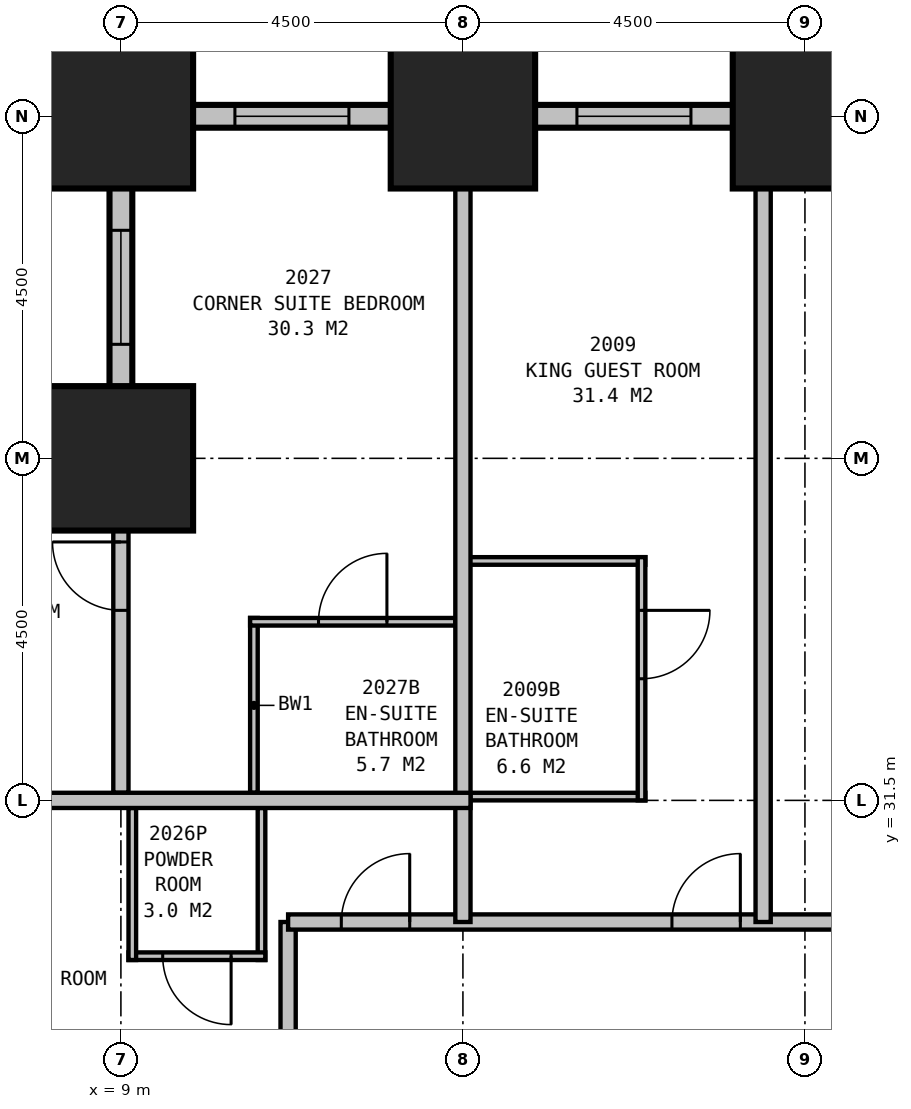
"""IFC4 building model, lengths in metres.
Left out: names, types, materials, properties, quantities, classifications, styles, units other than length and angle.
Written with IfcOpenShell. Run it as: python <this file> out.ifc"""

import sys

from ifc_helpers import new_model, si_unit, direction, frame, frame_2d, origin, origin_2d, place, context, subcontext, project, spatial, rectangle, extrude, element, fill, save


model = new_model("IFC4")
c1 = context("Model", 3, precision=1e-05, world=origin(), true_north=direction((0.0, 1.0)))
c2 = subcontext(c1, "Body", "Model", "MODEL_VIEW")
j1 = project(units=[si_unit("LENGTHUNIT", "METRE"), si_unit("PLANEANGLEUNIT", "RADIAN")], contexts=[c1])
p1 = place(None, origin())
s1 = spatial("IfcSite", under=j1, at=p1, CompositionType="ELEMENT")
p2 = place(p1, origin())
s2 = spatial("IfcBuilding", under=s1, at=p2, CompositionType="ELEMENT")
p3 = place(p2, frame((0.0, 0.0, 82.2)))
s3 = spatial("IfcBuildingStorey", under=s2, at=p3, CompositionType="ELEMENT", Elevation=82.2)
for number, where, z_axis, x_axis in (
    (1, (18.0, 40.5, 0.0), (0.0, 0.0, 1.0), (1.0, 0.0, 0.0)),
    (2, (13.5, 40.5, 0.0), (0.0, 0.0, 1.0), (1.0, 0.0, 0.0)),
    (3, (9.0, 40.5, 0.0), (0.0, 0.0, 1.0), (1.0, 0.0, 0.0)),
    (4, (9.0, 36.0, 0.0), (0.0, 0.0, 1.0), (1.0, 0.0, 0.0)),
):
    element("IfcColumn", number, at=place(p3, frame(where, z_axis=z_axis, x_axis=x_axis)), inside=s3, PredefinedType="COLUMN", context=c2, shape_type="SweptSolid", body=[
        extrude(rectangle(XDim=1.9, YDim=1.9, at=origin_2d()), origin(), (0.0, 0.0, 1.0), 3.5),
    ])
p4 = place(p3, frame((40.65, 40.5, 0.0), z_axis=(0.0, 0.0, 1.0), x_axis=(-1.0, 0.0, 0.0)))
e5 = element("IfcWall", 5, at=p4, inside=s3, PredefinedType="STANDARD", context=c2, shape_type="SweptSolid", body=[
    extrude(rectangle(XDim=31.8, YDim=0.3, at=frame_2d((15.9, 0.0))), origin(), (0.0, 0.0, 1.0), 2.1),
])
p5 = place(p4, frame((1.65, 0.0, 0.5)))
e6 = element("IfcOpeningElement", 6, at=p5, cuts=e5, PredefinedType="OPENING", context=c2, shape_type="SweptSolid", body=[
    extrude(rectangle(XDim=1.5, YDim=1.4, at=frame_2d((0.75, 0.7))), frame((0.0, 0.16, 0.0), z_axis=(0.0, -1.0, 0.0), x_axis=(1.0, 0.0, 0.0)), (0.0, 0.0, 1.0), 0.32),
])
p6 = place(p4, frame((6.15, 0.0, 0.5)))
e7 = element("IfcOpeningElement", 7, at=p6, cuts=e5, PredefinedType="OPENING", context=c2, shape_type="SweptSolid", body=[
    extrude(rectangle(XDim=1.5, YDim=1.4, at=frame_2d((0.75, 0.7))), frame((0.0, 0.16, 0.0), z_axis=(0.0, -1.0, 0.0), x_axis=(1.0, 0.0, 0.0)), (0.0, 0.0, 1.0), 0.32),
])
p7 = place(p4, frame((10.65, 0.0, 0.5)))
e8 = element("IfcOpeningElement", 8, at=p7, cuts=e5, PredefinedType="OPENING", context=c2, shape_type="SweptSolid", body=[
    extrude(rectangle(XDim=1.5, YDim=1.4, at=frame_2d((0.75, 0.7))), frame((0.0, 0.16, 0.0), z_axis=(0.0, -1.0, 0.0), x_axis=(1.0, 0.0, 0.0)), (0.0, 0.0, 1.0), 0.32),
])
p8 = place(p4, frame((15.15, 0.0, 0.5)))
e9 = element("IfcOpeningElement", 9, at=p8, cuts=e5, PredefinedType="OPENING", context=c2, shape_type="SweptSolid", body=[
    extrude(rectangle(XDim=1.5, YDim=1.4, at=frame_2d((0.75, 0.7))), frame((0.0, 0.16, 0.0), z_axis=(0.0, -1.0, 0.0), x_axis=(1.0, 0.0, 0.0)), (0.0, 0.0, 1.0), 0.32),
])
p9 = place(p4, frame((19.65, 0.0, 0.5)))
e10 = element("IfcOpeningElement", 10, at=p9, cuts=e5, PredefinedType="OPENING", context=c2, shape_type="SweptSolid", body=[
    extrude(rectangle(XDim=1.5, YDim=1.4, at=frame_2d((0.75, 0.7))), frame((0.0, 0.16, 0.0), z_axis=(0.0, -1.0, 0.0), x_axis=(1.0, 0.0, 0.0)), (0.0, 0.0, 1.0), 0.32),
])
p10 = place(p4, frame((24.15, 0.0, 0.5)))
e11 = element("IfcOpeningElement", 11, at=p10, cuts=e5, PredefinedType="OPENING", context=c2, shape_type="SweptSolid", body=[
    extrude(rectangle(XDim=1.5, YDim=1.4, at=frame_2d((0.75, 0.7))), frame((0.0, 0.16, 0.0), z_axis=(0.0, -1.0, 0.0), x_axis=(1.0, 0.0, 0.0)), (0.0, 0.0, 1.0), 0.32),
])
p11 = place(p4, frame((28.65, 0.0, 0.5)))
e12 = element("IfcOpeningElement", 12, at=p11, cuts=e5, PredefinedType="OPENING", context=c2, shape_type="SweptSolid", body=[
    extrude(rectangle(XDim=1.5, YDim=1.4, at=frame_2d((0.75, 0.7))), frame((0.0, 0.16, 0.0), z_axis=(0.0, -1.0, 0.0), x_axis=(1.0, 0.0, 0.0)), (0.0, 0.0, 1.0), 0.32),
])
p12 = place(p3, frame((9.0, 40.65, 0.0), z_axis=(0.0, 0.0, 1.0), x_axis=(0.0, -1.0, 0.0)))
e13 = element("IfcWall", 13, at=p12, inside=s3, PredefinedType="STANDARD", context=c2, shape_type="SweptSolid", body=[
    extrude(rectangle(XDim=4.8, YDim=0.3, at=frame_2d((2.4, 0.0))), origin(), (0.0, 0.0, 1.0), 2.1),
])
p13 = place(p12, frame((1.65, 0.0, 0.5)))
e14 = element("IfcOpeningElement", 14, at=p13, cuts=e13, PredefinedType="OPENING", context=c2, shape_type="SweptSolid", body=[
    extrude(rectangle(XDim=1.5, YDim=1.4, at=frame_2d((0.75, 0.7))), frame((0.0, 0.16, 0.0), z_axis=(0.0, -1.0, 0.0), x_axis=(1.0, 0.0, 0.0)), (0.0, 0.0, 1.0), 0.32),
])
p14 = place(p3, frame((9.15, 36.0, 0.0), z_axis=(0.0, 0.0, 1.0), x_axis=(-1.0, 0.0, 0.0)))
e15 = element("IfcWall", 15, at=p14, inside=s3, PredefinedType="STANDARD", context=c2, shape_type="SweptSolid", body=[
    extrude(rectangle(XDim=5.3, YDim=0.3, at=frame_2d((2.65, 0.0))), origin(), (0.0, 0.0, 1.0), 2.1),
])
p15 = place(p14, frame((1.45, 0.0, 0.5)))
e16 = element("IfcOpeningElement", 16, at=p15, cuts=e15, PredefinedType="OPENING", context=c2, shape_type="SweptSolid", body=[
    extrude(rectangle(XDim=2.4, YDim=1.4, at=frame_2d((1.2, 0.7))), frame((0.0, 0.16, 0.0), z_axis=(0.0, -1.0, 0.0), x_axis=(1.0, 0.0, 0.0)), (0.0, 0.0, 1.0), 0.32),
])
p16 = place(p3, frame((11.2, 29.9, 0.0), z_axis=(0.0, 0.0, 1.0), x_axis=(1.0, 0.0, 0.0)))
e17 = element("IfcWall", 17, at=p16, inside=s3, PredefinedType="PARTITIONING", context=c2, shape_type="SweptSolid", body=[
    extrude(rectangle(XDim=27.1, YDim=0.2, at=frame_2d((13.55, 0.0))), origin(), (0.0, 0.0, 1.0), 3.25),
])
p17 = place(p16, frame((5.05, 0.0, 0.0)))
e18 = element("IfcOpeningElement", 18, at=p17, cuts=e17, PredefinedType="OPENING", context=c2, shape_type="SweptSolid", body=[
    extrude(rectangle(XDim=0.9, YDim=2.1, at=frame_2d((0.45, 1.05))), frame((0.0, 0.11, 0.0), z_axis=(0.0, -1.0, 0.0), x_axis=(1.0, 0.0, 0.0)), (0.0, 0.0, 1.0), 0.22),
])
p18 = place(p16, frame((7.65, 0.0, 0.0)))
e19 = element("IfcOpeningElement", 19, at=p18, cuts=e17, PredefinedType="OPENING", context=c2, shape_type="SweptSolid", body=[
    extrude(rectangle(XDim=0.9, YDim=2.1, at=frame_2d((0.45, 1.05))), frame((0.0, 0.11, 0.0), z_axis=(0.0, -1.0, 0.0), x_axis=(1.0, 0.0, 0.0)), (0.0, 0.0, 1.0), 0.22),
])
p19 = place(p16, frame((12.0, 0.0, 0.0)))
e20 = element("IfcOpeningElement", 20, at=p19, cuts=e17, PredefinedType="OPENING", context=c2, shape_type="SweptSolid", body=[
    extrude(rectangle(XDim=1.0, YDim=2.1, at=frame_2d((0.5, 1.05))), frame((0.0, 0.11, 0.0), z_axis=(0.0, -1.0, 0.0), x_axis=(1.0, 0.0, 0.0)), (0.0, 0.0, 1.0), 0.22),
])
p20 = place(p16, frame((17.45, 0.0, 0.0)))
e21 = element("IfcOpeningElement", 21, at=p20, cuts=e17, PredefinedType="OPENING", context=c2, shape_type="SweptSolid", body=[
    extrude(rectangle(XDim=0.9, YDim=2.1, at=frame_2d((0.45, 1.05))), frame((0.0, 0.11, 0.0), z_axis=(0.0, -1.0, 0.0), x_axis=(1.0, 0.0, 0.0)), (0.0, 0.0, 1.0), 0.22),
])
p21 = place(p16, frame((21.8, 0.0, 0.0)))
e22 = element("IfcOpeningElement", 22, at=p21, cuts=e17, PredefinedType="OPENING", context=c2, shape_type="SweptSolid", body=[
    extrude(rectangle(XDim=0.9, YDim=2.1, at=frame_2d((0.45, 1.05))), frame((0.0, 0.11, 0.0), z_axis=(0.0, -1.0, 0.0), x_axis=(1.0, 0.0, 0.0)), (0.0, 0.0, 1.0), 0.22),
])
p22 = place(p16, frame((25.5, 0.0, 0.0)))
e23 = element("IfcOpeningElement", 23, at=p22, cuts=e17, PredefinedType="OPENING", context=c2, shape_type="SweptSolid", body=[
    extrude(rectangle(XDim=0.9, YDim=2.1, at=frame_2d((0.45, 1.05))), frame((0.0, 0.11, 0.0), z_axis=(0.0, -1.0, 0.0), x_axis=(1.0, 0.0, 0.0)), (0.0, 0.0, 1.0), 0.22),
])
p23 = place(p16, frame((0.7, 0.0, 0.0)))
e24 = element("IfcOpeningElement", 24, at=p23, cuts=e17, PredefinedType="OPENING", context=c2, shape_type="SweptSolid", body=[
    extrude(rectangle(XDim=0.9, YDim=2.1, at=frame_2d((0.45, 1.05))), frame((0.0, 0.11, 0.0), z_axis=(0.0, -1.0, 0.0), x_axis=(1.0, 0.0, 0.0)), (0.0, 0.0, 1.0), 0.22),
])
p24 = place(p3, frame((11.2, 11.2, 0.0), z_axis=(0.0, 0.0, 1.0), x_axis=(0.0, 1.0, 0.0)))
e25 = element("IfcWall", 25, at=p24, inside=s3, PredefinedType="PARTITIONING", context=c2, shape_type="SweptSolid", body=[
    extrude(rectangle(XDim=18.7, YDim=0.2, at=frame_2d((9.35, 0.0))), origin(), (0.0, 0.0, 1.0), 3.25),
])
p25 = place(p24, frame((3.05, 0.0, 0.0)))
e26 = element("IfcOpeningElement", 26, at=p25, cuts=e25, PredefinedType="OPENING", context=c2, shape_type="SweptSolid", body=[
    extrude(rectangle(XDim=1.0, YDim=2.1, at=frame_2d((0.5, 1.05))), frame((0.0, 0.11, 0.0), z_axis=(0.0, -1.0, 0.0), x_axis=(1.0, 0.0, 0.0)), (0.0, 0.0, 1.0), 0.22),
])
p26 = place(p24, frame((6.65, 0.0, 0.0)))
e27 = element("IfcOpeningElement", 27, at=p26, cuts=e25, PredefinedType="OPENING", context=c2, shape_type="SweptSolid", body=[
    extrude(rectangle(XDim=0.9, YDim=2.1, at=frame_2d((0.45, 1.05))), frame((0.0, 0.11, 0.0), z_axis=(0.0, -1.0, 0.0), x_axis=(1.0, 0.0, 0.0)), (0.0, 0.0, 1.0), 0.22),
])
p27 = place(p3, frame((17.45, 29.9, 0.0), z_axis=(0.0, 0.0, 1.0), x_axis=(0.0, 1.0, 0.0)))
e28 = element("IfcWall", 28, at=p27, inside=s3, PredefinedType="PARTITIONING", context=c2, shape_type="SweptSolid", body=[
    extrude(rectangle(XDim=10.6, YDim=0.2, at=frame_2d((5.3, 0.0))), origin(), (0.0, 0.0, 1.0), 2.2),
])
for number, where, z_axis, x_axis in (
    (29, (13.5, 31.55, 0.0), (0.0, 0.0, 1.0), (1.0, 0.0, 0.0)),
    (30, (13.5, 34.65, 0.0), (0.0, 0.0, 1.0), (1.0, 0.0, 0.0)),
):
    element("IfcWall", number, at=place(p3, frame(where, z_axis=z_axis, x_axis=x_axis)), inside=s3, PredefinedType="PLUMBINGWALL", context=c2, shape_type="SweptSolid", body=[
        extrude(rectangle(XDim=2.4, YDim=0.1, at=frame_2d((1.2, 0.0))), origin(), (0.0, 0.0, 1.0), 3.25),
    ])
p28 = place(p3, frame((15.85, 31.5, 0.0), z_axis=(0.0, 0.0, 1.0), x_axis=(0.0, 1.0, 0.0)))
e31 = element("IfcWall", 31, at=p28, inside=s3, PredefinedType="PLUMBINGWALL", context=c2, shape_type="SweptSolid", body=[
    extrude(rectangle(XDim=3.2, YDim=0.1, at=frame_2d((1.6, 0.0))), origin(), (0.0, 0.0, 1.0), 3.25),
])
p29 = place(p28, frame((2.5, 0.0, 0.0), z_axis=(0.0, 0.0, 1.0), x_axis=(-1.0, 0.0, 0.0)))
e32 = element("IfcOpeningElement", 32, at=p29, cuts=e31, PredefinedType="OPENING", context=c2, shape_type="SweptSolid", body=[
    extrude(rectangle(XDim=0.9, YDim=2.1, at=frame_2d((0.45, 1.05))), frame((0.0, 0.06, 0.0), z_axis=(0.0, -1.0, 0.0), x_axis=(1.0, 0.0, 0.0)), (0.0, 0.0, 1.0), 0.12),
])
p30 = place(p3, frame((13.5, 29.9, 0.0), z_axis=(0.0, 0.0, 1.0), x_axis=(0.0, 1.0, 0.0)))
e33 = element("IfcWall", 33, at=p30, inside=s3, PredefinedType="PARTITIONING", context=c2, shape_type="SweptSolid", body=[
    extrude(rectangle(XDim=10.6, YDim=0.2, at=frame_2d((5.3, 0.0))), origin(), (0.0, 0.0, 1.0), 2.2),
])
p31 = place(p3, frame((13.6, 31.5, 0.0), z_axis=(0.0, 0.0, 1.0), x_axis=(-1.0, 0.0, 0.0)))
e34 = element("IfcWall", 34, at=p31, inside=s3, PredefinedType="PARTITIONING", context=c2, shape_type="SweptSolid", body=[
    extrude(rectangle(XDim=10.099, YDim=0.2, at=frame_2d((5.05, 0.0))), origin(), (0.0, 0.0, 1.0), 3.25),
])
p32 = place(p31, frame((8.999, 0.0, 0.0), z_axis=(0.0, 0.0, 1.0), x_axis=(-1.0, 0.0, 0.0)))
e35 = element("IfcOpeningElement", 35, at=p32, cuts=e34, PredefinedType="OPENING", context=c2, shape_type="SweptSolid", body=[
    extrude(rectangle(XDim=0.9, YDim=2.1, at=frame_2d((0.45, 1.05))), frame((0.0, 0.11, 0.0), z_axis=(0.0, -1.0, 0.0), x_axis=(1.0, 0.0, 0.0)), (0.0, 0.0, 1.0), 0.22),
])
p33 = place(p3, frame((9.15, 31.4, 0.0), z_axis=(0.0, 0.0, 1.0), x_axis=(0.0, -1.0, 0.0)))
e36 = element("IfcWall", 36, at=p33, inside=s3, PredefinedType="PLUMBINGWALL", context=c2, shape_type="SweptSolid", body=[
    extrude(rectangle(XDim=2.0, YDim=0.1, at=frame_2d((1.0, 0.0))), origin(), (0.0, 0.0, 1.0), 2.2),
])
p34 = place(p3, frame((10.85, 31.4, 0.0), z_axis=(0.0, 0.0, 1.0), x_axis=(0.0, -1.0, 0.0)))
e37 = element("IfcWall", 37, at=p34, inside=s3, PredefinedType="PLUMBINGWALL", context=c2, shape_type="SweptSolid", body=[
    extrude(rectangle(XDim=2.0, YDim=0.1, at=frame_2d((1.0, 0.0))), origin(), (0.0, 0.0, 1.0), 3.25),
])
p35 = place(p3, frame((10.9, 29.45, 0.0), z_axis=(0.0, 0.0, 1.0), x_axis=(-1.0, 0.0, 0.0)))
e38 = element("IfcWall", 38, at=p35, inside=s3, PredefinedType="PLUMBINGWALL", context=c2, shape_type="SweptSolid", body=[
    extrude(rectangle(XDim=1.8, YDim=0.1, at=frame_2d((0.9, 0.0))), origin(), (0.0, 0.0, 1.0), 3.25),
])
p36 = place(p35, frame((0.45, 0.0, 0.0)))
e39 = element("IfcOpeningElement", 39, at=p36, cuts=e38, PredefinedType="OPENING", context=c2, shape_type="SweptSolid", body=[
    extrude(rectangle(XDim=0.9, YDim=2.1, at=frame_2d((0.45, 1.05))), frame((0.0, 0.06, 0.0), z_axis=(0.0, -1.0, 0.0), x_axis=(1.0, 0.0, 0.0)), (0.0, 0.0, 1.0), 0.12),
])
p37 = place(p3, frame((9.0, 31.6, 0.0), z_axis=(0.0, 0.0, 1.0), x_axis=(0.0, 1.0, 0.0)))
e40 = element("IfcWall", 40, at=p37, inside=s3, PredefinedType="PARTITIONING", context=c2, shape_type="SweptSolid", body=[
    extrude(rectangle(XDim=4.4, YDim=0.2, at=frame_2d((2.2, 0.0))), origin(), (0.0, 0.0, 1.0), 2.2),
])
p38 = place(p37, frame((2.4, 0.0, 0.0)))
e41 = element("IfcOpeningElement", 41, at=p38, cuts=e40, PredefinedType="OPENING", context=c2, shape_type="SweptSolid", body=[
    extrude(rectangle(XDim=0.9, YDim=2.1, at=frame_2d((0.45, 1.05))), frame((0.0, 0.11, 0.0), z_axis=(0.0, -1.0, 0.0), x_axis=(1.0, 0.0, 0.0)), (0.0, 0.0, 1.0), 0.22),
])
p39 = place(p3, frame((10.75, 31.6, 0.0), z_axis=(0.0, 0.0, 1.0), x_axis=(0.0, 1.0, 0.0)))
e42 = element("IfcWall", 42, at=p39, inside=s3, PredefinedType="PLUMBINGWALL", context=c2, shape_type="SweptSolid", body=[
    extrude(rectangle(XDim=2.3, YDim=0.1, at=frame_2d((1.15, 0.0))), origin(), (0.0, 0.0, 1.0), 3.25),
])
p40 = place(p3, frame((13.4, 33.85, 0.0), z_axis=(0.0, 0.0, 1.0), x_axis=(-1.0, 0.0, 0.0)))
e43 = element("IfcWall", 43, at=p40, inside=s3, PredefinedType="PLUMBINGWALL", context=c2, shape_type="SweptSolid", body=[
    extrude(rectangle(XDim=2.7, YDim=0.1, at=frame_2d((1.35, 0.0))), origin(), (0.0, 0.0, 1.0), 3.25),
])
p41 = place(p40, frame((1.8, 0.0, 0.0), z_axis=(0.0, 0.0, 1.0), x_axis=(-1.0, 0.0, 0.0)))
e44 = element("IfcOpeningElement", 44, at=p41, cuts=e43, PredefinedType="OPENING", context=c2, shape_type="SweptSolid", body=[
    extrude(rectangle(XDim=0.9, YDim=2.1, at=frame_2d((0.45, 1.05))), frame((0.0, 0.06, 0.0), z_axis=(0.0, -1.0, 0.0), x_axis=(1.0, 0.0, 0.0)), (0.0, 0.0, 1.0), 0.12),
])
p42 = place(p10, origin())
e45 = element("IfcWindow", 45, at=p42, inside=s3, PartitioningType="SINGLE_PANEL", PredefinedType="WINDOW", context=c2, shape_type="SweptSolid", body=[
    extrude(rectangle(XDim=1.5, YDim=1.4, at=frame_2d((0.75, 0.7))), frame((0.0, 0.03, 0.0), z_axis=(0.0, -1.0, 0.0), x_axis=(1.0, 0.0, 0.0)), (0.0, 0.0, 1.0), 0.06),
])
fill(e11, e45)
p43 = place(p11, origin())
e46 = element("IfcWindow", 46, at=p43, inside=s3, PartitioningType="SINGLE_PANEL", PredefinedType="WINDOW", context=c2, shape_type="SweptSolid", body=[
    extrude(rectangle(XDim=1.5, YDim=1.4, at=frame_2d((0.75, 0.7))), frame((0.0, 0.03, 0.0), z_axis=(0.0, -1.0, 0.0), x_axis=(1.0, 0.0, 0.0)), (0.0, 0.0, 1.0), 0.06),
])
fill(e12, e46)
p44 = place(p13, origin())
e47 = element("IfcWindow", 47, at=p44, inside=s3, PartitioningType="SINGLE_PANEL", PredefinedType="WINDOW", context=c2, shape_type="SweptSolid", body=[
    extrude(rectangle(XDim=1.5, YDim=1.4, at=frame_2d((0.75, 0.7))), frame((0.0, 0.03, 0.0), z_axis=(0.0, -1.0, 0.0), x_axis=(1.0, 0.0, 0.0)), (0.0, 0.0, 1.0), 0.06),
])
fill(e14, e47)
p45 = place(p17, origin())
e48 = element("IfcDoor", 48, at=p45, inside=s3, OperationType="SINGLE_SWING_RIGHT", PredefinedType="DOOR", context=c2, shape_type="SweptSolid", body=[
    extrude(rectangle(XDim=0.9, YDim=2.1, at=frame_2d((0.45, 1.05))), frame((0.0, 0.025, 0.0), z_axis=(0.0, -1.0, 0.0), x_axis=(1.0, 0.0, 0.0)), (0.0, 0.0, 1.0), 0.05),
])
fill(e18, e48)
p46 = place(p23, origin())
e49 = element("IfcDoor", 49, at=p46, inside=s3, OperationType="SINGLE_SWING_RIGHT", PredefinedType="DOOR", context=c2, shape_type="SweptSolid", body=[
    extrude(rectangle(XDim=0.9, YDim=2.1, at=frame_2d((0.45, 1.05))), frame((0.0, 0.025, 0.0), z_axis=(0.0, -1.0, 0.0), x_axis=(1.0, 0.0, 0.0)), (0.0, 0.0, 1.0), 0.05),
])
fill(e24, e49)
p47 = place(p29, origin())
e50 = element("IfcDoor", 50, at=p47, inside=s3, OperationType="SINGLE_SWING_LEFT", PredefinedType="DOOR", context=c2, shape_type="SweptSolid", body=[
    extrude(rectangle(XDim=0.9, YDim=2.1, at=frame_2d((0.45, 1.05))), frame((0.0, 0.025, 0.0), z_axis=(0.0, -1.0, 0.0), x_axis=(1.0, 0.0, 0.0)), (0.0, 0.0, 1.0), 0.05),
])
fill(e32, e50)
p48 = place(p36, origin())
e51 = element("IfcDoor", 51, at=p48, inside=s3, OperationType="SINGLE_SWING_LEFT", PredefinedType="DOOR", context=c2, shape_type="SweptSolid", body=[
    extrude(rectangle(XDim=0.9, YDim=2.1, at=frame_2d((0.45, 1.05))), frame((0.0, 0.025, 0.0), z_axis=(0.0, -1.0, 0.0), x_axis=(1.0, 0.0, 0.0)), (0.0, 0.0, 1.0), 0.05),
])
fill(e39, e51)
p49 = place(p38, origin())
e52 = element("IfcDoor", 52, at=p49, inside=s3, OperationType="SINGLE_SWING_RIGHT", PredefinedType="DOOR", context=c2, shape_type="SweptSolid", body=[
    extrude(rectangle(XDim=0.9, YDim=2.1, at=frame_2d((0.45, 1.05))), frame((0.0, 0.025, 0.0), z_axis=(0.0, -1.0, 0.0), x_axis=(1.0, 0.0, 0.0)), (0.0, 0.0, 1.0), 0.05),
])
fill(e41, e52)
p50 = place(p41, origin())
e53 = element("IfcDoor", 53, at=p50, inside=s3, OperationType="SINGLE_SWING_RIGHT", PredefinedType="DOOR", context=c2, shape_type="SweptSolid", body=[
    extrude(rectangle(XDim=0.9, YDim=2.1, at=frame_2d((0.45, 1.05))), frame((0.0, 0.025, 0.0), z_axis=(0.0, -1.0, 0.0), x_axis=(1.0, 0.0, 0.0)), (0.0, 0.0, 1.0), 0.05),
])
fill(e44, e53)
save(model, sys.argv[1])
